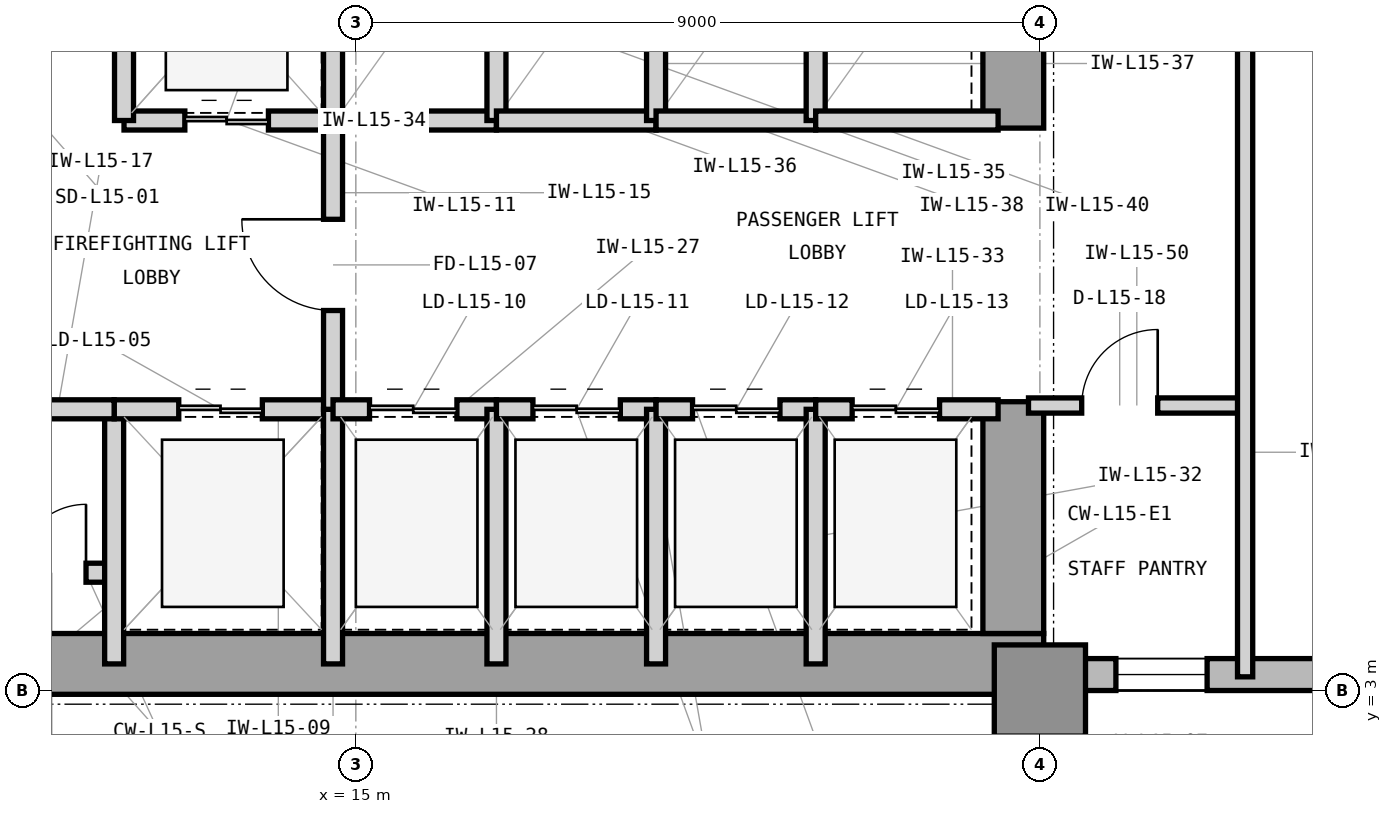
"""IFC4 building model, lengths in metres.
Left out: names, types, materials, properties, quantities, classifications, styles, units other than length and angle.
Written with IfcOpenShell. Run it as: python <this file> out.ifc"""

import sys

from ifc_helpers import new_model, si_unit, direction, frame, frame_2d, origin, origin_2d, place, context, subcontext, project, spatial, rectangle, extrude, element, fill, save


model = new_model("IFC4")
c1 = context("Model", 3, precision=1e-05, world=origin(), true_north=direction((0.0, 1.0)))
c2 = subcontext(c1, "Body", "Model", "MODEL_VIEW")
j1 = project(units=[si_unit("LENGTHUNIT", "METRE"), si_unit("PLANEANGLEUNIT", "RADIAN")], contexts=[c1])
p1 = place(None, origin())
s1 = spatial("IfcSite", under=j1, at=p1, CompositionType="ELEMENT")
p2 = place(p1, origin())
s2 = spatial("IfcBuilding", under=s1, at=p2, CompositionType="ELEMENT")
p3 = place(p2, frame((0.0, 0.0, 67.8)))
s3 = spatial("IfcBuildingStorey", under=s2, at=p3, CompositionType="ELEMENT", Elevation=67.8)
p4 = place(p3, frame((7.475, 3.35, 0.0), z_axis=(0.0, 0.0, 1.0), x_axis=(1.0, 0.0, 0.0)))
e1 = element("IfcWall", 1, at=p4, inside=s3, PredefinedType="SHEAR", context=c2, shape_type="SweptSolid", body=[
    extrude(rectangle(XDim=16.575, YDim=0.8, at=frame_2d((8.288, 0.0))), origin(), (0.0, 0.0, 1.0), 4.2),
])
p5 = place(p3, frame((23.65, 3.75, 0.0), z_axis=(0.0, 0.0, 1.0), x_axis=(0.0, 1.0, 0.0)))
e2 = element("IfcWall", 2, at=p5, inside=s3, PredefinedType="SHEAR", context=c2, shape_type="SweptSolid", body=[
    extrude(rectangle(XDim=3.05, YDim=0.8, at=frame_2d((1.525, 0.0))), origin(), (0.0, 0.0, 1.0), 4.2),
])
p6 = place(p3, frame((23.65, 10.4, 0.0), z_axis=(0.0, 0.0, 1.0), x_axis=(0.0, 1.0, 0.0)))
e3 = element("IfcWall", 3, at=p6, inside=s3, PredefinedType="SHEAR", context=c2, shape_type="SweptSolid", body=[
    extrude(rectangle(XDim=3.2, YDim=0.8, at=frame_2d((1.6, 0.0))), origin(), (0.0, 0.0, 1.0), 4.2),
])
p7 = place(p3, frame((24.0, 3.0, 0.0), z_axis=(0.0, 0.0, 1.0), x_axis=(1.0, 0.0, 0.0)))
e4 = element("IfcColumn", 4, at=p7, inside=s3, PredefinedType="COLUMN", context=c2, shape_type="SweptSolid", body=[
    extrude(rectangle(XDim=1.2, YDim=1.2, at=origin_2d()), origin(), (0.0, 0.0, 1.0), 4.2),
])
p8 = place(p3, frame((23.9, 3.21, 0.0), z_axis=(0.0, 0.0, 1.0), x_axis=(1.0, 0.0, 0.0)))
e5 = element("IfcWall", 5, at=p8, inside=s3, PredefinedType="STANDARD", context=c2, shape_type="SweptSolid", body=[
    extrude(rectangle(XDim=40.5, YDim=0.42, at=frame_2d((20.25, 0.0))), origin(), (0.0, 0.0, 1.0), 3.98),
])
p9 = place(p8, frame((1.1, 0.0, 0.85)))
e6 = element("IfcOpeningElement", 6, at=p9, cuts=e5, PredefinedType="OPENING", context=c2, shape_type="SweptSolid", body=[
    extrude(rectangle(XDim=1.2, YDim=2.45, at=frame_2d((0.6, 1.225))), frame((0.0, 0.22, 0.0), z_axis=(0.0, -1.0, 0.0), x_axis=(1.0, 0.0, 0.0)), (0.0, 0.0, 1.0), 0.44),
])
p10 = place(p8, frame((5.136, 0.0, 0.85)))
e7 = element("IfcOpeningElement", 7, at=p10, cuts=e5, PredefinedType="OPENING", context=c2, shape_type="SweptSolid", body=[
    extrude(rectangle(XDim=2.8, YDim=2.45, at=frame_2d((1.4, 1.225))), frame((0.0, 0.22, 0.0), z_axis=(0.0, -1.0, 0.0), x_axis=(1.0, 0.0, 0.0)), (0.0, 0.0, 1.0), 0.44),
])
p11 = place(p8, frame((12.636, 0.0, 0.85)))
e8 = element("IfcOpeningElement", 8, at=p11, cuts=e5, PredefinedType="OPENING", context=c2, shape_type="SweptSolid", body=[
    extrude(rectangle(XDim=2.8, YDim=2.45, at=frame_2d((1.4, 1.225))), frame((0.0, 0.22, 0.0), z_axis=(0.0, -1.0, 0.0), x_axis=(1.0, 0.0, 0.0)), (0.0, 0.0, 1.0), 0.44),
])
p12 = place(p8, frame((20.336, 0.0, 0.85)))
e9 = element("IfcOpeningElement", 9, at=p12, cuts=e5, PredefinedType="OPENING", context=c2, shape_type="SweptSolid", body=[
    extrude(rectangle(XDim=2.8, YDim=2.45, at=frame_2d((1.4, 1.225))), frame((0.0, 0.22, 0.0), z_axis=(0.0, -1.0, 0.0), x_axis=(1.0, 0.0, 0.0)), (0.0, 0.0, 1.0), 0.44),
])
p13 = place(p8, frame((30.886, 0.0, 0.85)))
e10 = element("IfcOpeningElement", 10, at=p13, cuts=e5, PredefinedType="OPENING", context=c2, shape_type="SweptSolid", body=[
    extrude(rectangle(XDim=1.2, YDim=2.45, at=frame_2d((0.6, 1.225))), frame((0.0, 0.22, 0.0), z_axis=(0.0, -1.0, 0.0), x_axis=(1.0, 0.0, 0.0)), (0.0, 0.0, 1.0), 0.44),
])
p14 = place(p3, frame((10.33, 4.55, 0.0), z_axis=(0.0, 0.0, 1.0), x_axis=(1.0, 0.0, 0.0)))
e11 = element("IfcWall", 11, at=p14, inside=s3, PredefinedType="PARTITIONING", context=c2, shape_type="SweptSolid", body=[
    extrude(rectangle(XDim=1.49, YDim=0.25, at=frame_2d((0.745, 0.0))), origin(), (0.0, 0.0, 1.0), 3.97),
])
p15 = place(p14, frame((0.22, 0.0, 0.0)))
e12 = element("IfcOpeningElement", 12, at=p15, cuts=e11, PredefinedType="OPENING", context=c2, shape_type="SweptSolid", body=[
    extrude(rectangle(XDim=0.9, YDim=2.1, at=frame_2d((0.45, 1.05))), frame((0.0, 0.135, 0.0), z_axis=(0.0, -1.0, 0.0), x_axis=(1.0, 0.0, 0.0)), (0.0, 0.0, 1.0), 0.27),
])
p16 = place(p3, frame((11.82, 3.35, 0.0), z_axis=(0.0, 0.0, 1.0), x_axis=(0.0, 1.0, 0.0)))
e13 = element("IfcWall", 13, at=p16, inside=s3, PredefinedType="PARTITIONING", context=c2, shape_type="SweptSolid", body=[
    extrude(rectangle(XDim=3.35, YDim=0.25, at=frame_2d((1.675, 0.0))), origin(), (0.0, 0.0, 1.0), 3.97),
])
p17 = place(p3, frame((11.82, 6.7, 0.0), z_axis=(0.0, 0.0, 1.0), x_axis=(1.0, 0.0, 0.0)))
e14 = element("IfcWall", 14, at=p17, inside=s3, PredefinedType="PARTITIONING", context=c2, shape_type="SweptSolid", body=[
    extrude(rectangle(XDim=2.88, YDim=0.25, at=frame_2d((1.44, 0.0))), origin(), (0.0, 0.0, 1.0), 3.426),
])
p18 = place(p17, frame((0.85, 0.0, 0.0)))
e15 = element("IfcOpeningElement", 15, at=p18, cuts=e14, PredefinedType="OPENING", context=c2, shape_type="SweptSolid", body=[
    extrude(rectangle(XDim=1.1, YDim=2.25, at=frame_2d((0.55, 1.125))), frame((0.0, 0.135, 0.0), z_axis=(0.0, -1.0, 0.0), x_axis=(1.0, 0.0, 0.0)), (0.0, 0.0, 1.0), 0.27),
])
p19 = place(p3, frame((14.7, 3.35, 0.0), z_axis=(0.0, 0.0, 1.0), x_axis=(0.0, 1.0, 0.0)))
e16 = element("IfcWall", 16, at=p19, inside=s3, PredefinedType="PARTITIONING", context=c2, shape_type="SweptSolid", body=[
    extrude(rectangle(XDim=3.35, YDim=0.25, at=frame_2d((1.675, 0.0))), origin(), (0.0, 0.0, 1.0), 3.97),
])
p20 = place(p3, frame((11.95, 10.5, 0.0), z_axis=(0.0, 0.0, 1.0), x_axis=(1.0, 0.0, 0.0)))
e17 = element("IfcWall", 17, at=p20, inside=s3, PredefinedType="PARTITIONING", context=c2, shape_type="SweptSolid", body=[
    extrude(rectangle(XDim=2.75, YDim=0.25, at=frame_2d((1.375, 0.0))), origin(), (0.0, 0.0, 1.0), 3.426),
])
p21 = place(p20, frame((0.8, 0.0, 0.0)))
e18 = element("IfcOpeningElement", 18, at=p21, cuts=e17, PredefinedType="OPENING", context=c2, shape_type="SweptSolid", body=[
    extrude(rectangle(XDim=1.1, YDim=2.25, at=frame_2d((0.55, 1.125))), frame((0.0, 0.135, 0.0), z_axis=(0.0, -1.0, 0.0), x_axis=(1.0, 0.0, 0.0)), (0.0, 0.0, 1.0), 0.27),
])
for number, where, z_axis, x_axis in (
    (19, (11.95, 10.5, 0.0), (0.0, 0.0, 1.0), (0.0, 1.0, 0.0)),
    (20, (14.7, 10.5, 0.0), (0.0, 0.0, 1.0), (0.0, 1.0, 0.0)),
):
    element("IfcWall", number, at=place(p3, frame(where, z_axis=z_axis, x_axis=x_axis)), inside=s3, PredefinedType="PARTITIONING", context=c2, shape_type="SweptSolid", body=[
        extrude(rectangle(XDim=3.0, YDim=0.25, at=frame_2d((1.5, 0.0))), origin(), (0.0, 0.0, 1.0), 3.97),
    ])
p22 = place(p3, frame((14.7, 6.7, 0.0), z_axis=(0.0, 0.0, 1.0), x_axis=(0.0, 1.0, 0.0)))
e21 = element("IfcWall", 21, at=p22, inside=s3, PredefinedType="PARTITIONING", context=c2, shape_type="SweptSolid", body=[
    extrude(rectangle(XDim=3.8, YDim=0.25, at=frame_2d((1.9, 0.0))), origin(), (0.0, 0.0, 1.0), 3.97),
])
p23 = place(p22, frame((1.3, 0.0, 0.0)))
e22 = element("IfcOpeningElement", 22, at=p23, cuts=e21, PredefinedType="OPENING", context=c2, shape_type="SweptSolid", body=[
    extrude(rectangle(XDim=1.2, YDim=2.2, at=frame_2d((0.6, 1.1))), frame((0.0, 0.135, 0.0), z_axis=(0.0, -1.0, 0.0), x_axis=(1.0, 0.0, 0.0)), (0.0, 0.0, 1.0), 0.27),
])
p24 = place(p3, frame((10.33, 6.7, 0.0), z_axis=(0.0, 0.0, 1.0), x_axis=(1.0, 0.0, 0.0)))
e23 = element("IfcWall", 23, at=p24, inside=s3, PredefinedType="PARTITIONING", context=c2, shape_type="SweptSolid", body=[
    extrude(rectangle(XDim=1.49, YDim=0.25, at=frame_2d((0.745, 0.0))), origin(), (0.0, 0.0, 1.0), 3.426),
])
p25 = place(p3, frame((14.7, 6.7, 0.0), z_axis=(0.0, 0.0, 1.0), x_axis=(1.0, 0.0, 0.0)))
e24 = element("IfcWall", 24, at=p25, inside=s3, PredefinedType="PARTITIONING", context=c2, shape_type="SweptSolid", body=[
    extrude(rectangle(XDim=2.15, YDim=0.25, at=frame_2d((1.075, 0.0))), origin(), (0.0, 0.0, 1.0), 3.426),
])
p26 = place(p25, frame((0.48, 0.0, 0.0)))
e25 = element("IfcOpeningElement", 25, at=p26, cuts=e24, PredefinedType="OPENING", context=c2, shape_type="SweptSolid", body=[
    extrude(rectangle(XDim=1.15, YDim=2.25, at=frame_2d((0.575, 1.125))), frame((0.0, 0.135, 0.0), z_axis=(0.0, -1.0, 0.0), x_axis=(1.0, 0.0, 0.0)), (0.0, 0.0, 1.0), 0.27),
])
p27 = place(p3, frame((16.85, 3.35, 0.0), z_axis=(0.0, 0.0, 1.0), x_axis=(0.0, 1.0, 0.0)))
e26 = element("IfcWall", 26, at=p27, inside=s3, PredefinedType="PARTITIONING", context=c2, shape_type="SweptSolid", body=[
    extrude(rectangle(XDim=3.35, YDim=0.25, at=frame_2d((1.675, 0.0))), origin(), (0.0, 0.0, 1.0), 3.97),
])
p28 = place(p3, frame((16.85, 6.7, 0.0), z_axis=(0.0, 0.0, 1.0), x_axis=(1.0, 0.0, 0.0)))
e27 = element("IfcWall", 27, at=p28, inside=s3, PredefinedType="PARTITIONING", context=c2, shape_type="SweptSolid", body=[
    extrude(rectangle(XDim=2.1, YDim=0.25, at=frame_2d((1.05, 0.0))), origin(), (0.0, 0.0, 1.0), 3.426),
])
p29 = place(p28, frame((0.48, 0.0, 0.0)))
e28 = element("IfcOpeningElement", 28, at=p29, cuts=e27, PredefinedType="OPENING", context=c2, shape_type="SweptSolid", body=[
    extrude(rectangle(XDim=1.15, YDim=2.25, at=frame_2d((0.575, 1.125))), frame((0.0, 0.135, 0.0), z_axis=(0.0, -1.0, 0.0), x_axis=(1.0, 0.0, 0.0)), (0.0, 0.0, 1.0), 0.27),
])
p30 = place(p3, frame((18.95, 3.35, 0.0), z_axis=(0.0, 0.0, 1.0), x_axis=(0.0, 1.0, 0.0)))
e29 = element("IfcWall", 29, at=p30, inside=s3, PredefinedType="PARTITIONING", context=c2, shape_type="SweptSolid", body=[
    extrude(rectangle(XDim=3.35, YDim=0.25, at=frame_2d((1.675, 0.0))), origin(), (0.0, 0.0, 1.0), 3.97),
])
p31 = place(p3, frame((18.95, 6.7, 0.0), z_axis=(0.0, 0.0, 1.0), x_axis=(1.0, 0.0, 0.0)))
e30 = element("IfcWall", 30, at=p31, inside=s3, PredefinedType="PARTITIONING", context=c2, shape_type="SweptSolid", body=[
    extrude(rectangle(XDim=2.1, YDim=0.25, at=frame_2d((1.05, 0.0))), origin(), (0.0, 0.0, 1.0), 3.426),
])
p32 = place(p31, frame((0.48, 0.0, 0.0)))
e31 = element("IfcOpeningElement", 31, at=p32, cuts=e30, PredefinedType="OPENING", context=c2, shape_type="SweptSolid", body=[
    extrude(rectangle(XDim=1.15, YDim=2.25, at=frame_2d((0.575, 1.125))), frame((0.0, 0.135, 0.0), z_axis=(0.0, -1.0, 0.0), x_axis=(1.0, 0.0, 0.0)), (0.0, 0.0, 1.0), 0.27),
])
p33 = place(p3, frame((21.05, 3.35, 0.0), z_axis=(0.0, 0.0, 1.0), x_axis=(0.0, 1.0, 0.0)))
e32 = element("IfcWall", 32, at=p33, inside=s3, PredefinedType="PARTITIONING", context=c2, shape_type="SweptSolid", body=[
    extrude(rectangle(XDim=3.35, YDim=0.25, at=frame_2d((1.675, 0.0))), origin(), (0.0, 0.0, 1.0), 3.97),
])
p34 = place(p3, frame((21.05, 6.7, 0.0), z_axis=(0.0, 0.0, 1.0), x_axis=(1.0, 0.0, 0.0)))
e33 = element("IfcWall", 33, at=p34, inside=s3, PredefinedType="PARTITIONING", context=c2, shape_type="SweptSolid", body=[
    extrude(rectangle(XDim=2.4, YDim=0.25, at=frame_2d((1.2, 0.0))), origin(), (0.0, 0.0, 1.0), 3.426),
])
p35 = place(p34, frame((0.48, 0.0, 0.0)))
e34 = element("IfcOpeningElement", 34, at=p35, cuts=e33, PredefinedType="OPENING", context=c2, shape_type="SweptSolid", body=[
    extrude(rectangle(XDim=1.15, YDim=2.25, at=frame_2d((0.575, 1.125))), frame((0.0, 0.135, 0.0), z_axis=(0.0, -1.0, 0.0), x_axis=(1.0, 0.0, 0.0)), (0.0, 0.0, 1.0), 0.27),
])
p36 = place(p3, frame((14.7, 10.5, 0.0), z_axis=(0.0, 0.0, 1.0), x_axis=(1.0, 0.0, 0.0)))
e35 = element("IfcWall", 35, at=p36, inside=s3, PredefinedType="PARTITIONING", context=c2, shape_type="SweptSolid", body=[
    extrude(rectangle(XDim=2.15, YDim=0.25, at=frame_2d((1.075, 0.0))), origin(), (0.0, 0.0, 1.0), 3.426),
])
p37 = place(p3, frame((16.85, 10.5, 0.0), z_axis=(0.0, 0.0, 1.0), x_axis=(0.0, 1.0, 0.0)))
e36 = element("IfcWall", 36, at=p37, inside=s3, PredefinedType="PARTITIONING", context=c2, shape_type="SweptSolid", body=[
    extrude(rectangle(XDim=3.0, YDim=0.25, at=frame_2d((1.5, 0.0))), origin(), (0.0, 0.0, 1.0), 3.97),
])
p38 = place(p3, frame((16.85, 10.5, 0.0), z_axis=(0.0, 0.0, 1.0), x_axis=(1.0, 0.0, 0.0)))
e37 = element("IfcWall", 37, at=p38, inside=s3, PredefinedType="PARTITIONING", context=c2, shape_type="SweptSolid", body=[
    extrude(rectangle(XDim=2.1, YDim=0.25, at=frame_2d((1.05, 0.0))), origin(), (0.0, 0.0, 1.0), 3.426),
])
p39 = place(p3, frame((18.95, 10.5, 0.0), z_axis=(0.0, 0.0, 1.0), x_axis=(0.0, 1.0, 0.0)))
e38 = element("IfcWall", 38, at=p39, inside=s3, PredefinedType="PARTITIONING", context=c2, shape_type="SweptSolid", body=[
    extrude(rectangle(XDim=3.0, YDim=0.25, at=frame_2d((1.5, 0.0))), origin(), (0.0, 0.0, 1.0), 3.97),
])
p40 = place(p3, frame((18.95, 10.5, 0.0), z_axis=(0.0, 0.0, 1.0), x_axis=(1.0, 0.0, 0.0)))
e39 = element("IfcWall", 39, at=p40, inside=s3, PredefinedType="PARTITIONING", context=c2, shape_type="SweptSolid", body=[
    extrude(rectangle(XDim=2.1, YDim=0.25, at=frame_2d((1.05, 0.0))), origin(), (0.0, 0.0, 1.0), 3.426),
])
p41 = place(p3, frame((21.05, 10.5, 0.0), z_axis=(0.0, 0.0, 1.0), x_axis=(0.0, 1.0, 0.0)))
e40 = element("IfcWall", 40, at=p41, inside=s3, PredefinedType="PARTITIONING", context=c2, shape_type="SweptSolid", body=[
    extrude(rectangle(XDim=3.0, YDim=0.25, at=frame_2d((1.5, 0.0))), origin(), (0.0, 0.0, 1.0), 3.97),
])
p42 = place(p3, frame((21.05, 10.5, 0.0), z_axis=(0.0, 0.0, 1.0), x_axis=(1.0, 0.0, 0.0)))
e41 = element("IfcWall", 41, at=p42, inside=s3, PredefinedType="PARTITIONING", context=c2, shape_type="SweptSolid", body=[
    extrude(rectangle(XDim=2.4, YDim=0.25, at=frame_2d((1.2, 0.0))), origin(), (0.0, 0.0, 1.0), 3.426),
])
p43 = place(p3, frame((23.85, 6.75, 0.0), z_axis=(0.0, 0.0, 1.0), x_axis=(1.0, 0.0, 0.0)))
e42 = element("IfcWall", 42, at=p43, inside=s3, PredefinedType="PARTITIONING", context=c2, shape_type="SweptSolid", body=[
    extrude(rectangle(XDim=2.85, YDim=0.2, at=frame_2d((1.425, 0.0))), origin(), (0.0, 0.0, 1.0), 3.97),
])
p44 = place(p43, frame((0.7, 0.0, 0.0)))
e43 = element("IfcOpeningElement", 43, at=p44, cuts=e42, PredefinedType="OPENING", context=c2, shape_type="SweptSolid", body=[
    extrude(rectangle(XDim=1.0, YDim=2.15, at=frame_2d((0.5, 1.075))), frame((0.0, 0.11, 0.0), z_axis=(0.0, -1.0, 0.0), x_axis=(1.0, 0.0, 0.0)), (0.0, 0.0, 1.0), 0.22),
])
p45 = place(p3, frame((26.7, 3.18, 0.0), z_axis=(0.0, 0.0, 1.0), x_axis=(0.0, 1.0, 0.0)))
e44 = element("IfcWall", 44, at=p45, inside=s3, PredefinedType="PARTITIONING", context=c2, shape_type="SweptSolid", body=[
    extrude(rectangle(XDim=11.82, YDim=0.2, at=frame_2d((5.91, 0.0))), origin(), (0.0, 0.0, 1.0), 3.97),
])
p46 = place(p15, origin())
e45 = element("IfcDoor", 45, at=p46, inside=s3, OperationType="SINGLE_SWING_RIGHT", PredefinedType="TRAPDOOR", context=c2, shape_type="SweptSolid", body=[
    extrude(rectangle(XDim=0.9, YDim=2.1, at=frame_2d((0.45, 1.05))), frame((0.0, 0.025, 0.0), z_axis=(0.0, -1.0, 0.0), x_axis=(1.0, 0.0, 0.0)), (0.0, 0.0, 1.0), 0.05),
])
fill(e12, e45)
p47 = place(p18, origin())
e46 = element("IfcDoor", 46, at=p47, inside=s3, OperationType="DOUBLE_DOOR_SLIDING", PredefinedType="DOOR", context=c2, shape_type="SweptSolid", body=[
    extrude(rectangle(XDim=1.1, YDim=2.25, at=frame_2d((0.55, 1.125))), frame((0.0, 0.025, 0.0), z_axis=(0.0, -1.0, 0.0), x_axis=(1.0, 0.0, 0.0)), (0.0, 0.0, 1.0), 0.05),
])
fill(e15, e46)
p48 = place(p21, origin())
e47 = element("IfcDoor", 47, at=p48, inside=s3, OperationType="DOUBLE_DOOR_SLIDING", PredefinedType="DOOR", context=c2, shape_type="SweptSolid", body=[
    extrude(rectangle(XDim=1.1, YDim=2.25, at=frame_2d((0.55, 1.125))), frame((0.0, 0.025, 0.0), z_axis=(0.0, -1.0, 0.0), x_axis=(1.0, 0.0, 0.0)), (0.0, 0.0, 1.0), 0.05),
])
fill(e18, e47)
p49 = place(p23, origin())
e48 = element("IfcDoor", 48, at=p49, inside=s3, OperationType="SINGLE_SWING_RIGHT", PredefinedType="DOOR", context=c2, shape_type="SweptSolid", body=[
    extrude(rectangle(XDim=1.2, YDim=2.2, at=frame_2d((0.6, 1.1))), frame((0.0, 0.025, 0.0), z_axis=(0.0, -1.0, 0.0), x_axis=(1.0, 0.0, 0.0)), (0.0, 0.0, 1.0), 0.05),
])
fill(e22, e48)
p50 = place(p26, origin())
e49 = element("IfcDoor", 49, at=p50, inside=s3, OperationType="DOUBLE_DOOR_SLIDING", PredefinedType="DOOR", context=c2, shape_type="SweptSolid", body=[
    extrude(rectangle(XDim=1.15, YDim=2.25, at=frame_2d((0.575, 1.125))), frame((0.0, 0.025, 0.0), z_axis=(0.0, -1.0, 0.0), x_axis=(1.0, 0.0, 0.0)), (0.0, 0.0, 1.0), 0.05),
])
fill(e25, e49)
p51 = place(p29, origin())
e50 = element("IfcDoor", 50, at=p51, inside=s3, OperationType="DOUBLE_DOOR_SLIDING", PredefinedType="DOOR", context=c2, shape_type="SweptSolid", body=[
    extrude(rectangle(XDim=1.15, YDim=2.25, at=frame_2d((0.575, 1.125))), frame((0.0, 0.025, 0.0), z_axis=(0.0, -1.0, 0.0), x_axis=(1.0, 0.0, 0.0)), (0.0, 0.0, 1.0), 0.05),
])
fill(e28, e50)
p52 = place(p32, origin())
e51 = element("IfcDoor", 51, at=p52, inside=s3, OperationType="DOUBLE_DOOR_SLIDING", PredefinedType="DOOR", context=c2, shape_type="SweptSolid", body=[
    extrude(rectangle(XDim=1.15, YDim=2.25, at=frame_2d((0.575, 1.125))), frame((0.0, 0.025, 0.0), z_axis=(0.0, -1.0, 0.0), x_axis=(1.0, 0.0, 0.0)), (0.0, 0.0, 1.0), 0.05),
])
fill(e31, e51)
p53 = place(p35, origin())
e52 = element("IfcDoor", 52, at=p53, inside=s3, OperationType="DOUBLE_DOOR_SLIDING", PredefinedType="DOOR", context=c2, shape_type="SweptSolid", body=[
    extrude(rectangle(XDim=1.15, YDim=2.25, at=frame_2d((0.575, 1.125))), frame((0.0, 0.025, 0.0), z_axis=(0.0, -1.0, 0.0), x_axis=(1.0, 0.0, 0.0)), (0.0, 0.0, 1.0), 0.05),
])
fill(e34, e52)
p54 = place(p44, origin())
e53 = element("IfcDoor", 53, at=p54, inside=s3, OperationType="SINGLE_SWING_RIGHT", PredefinedType="DOOR", context=c2, shape_type="SweptSolid", body=[
    extrude(rectangle(XDim=1.0, YDim=2.15, at=frame_2d((0.5, 1.075))), frame((0.0, 0.025, 0.0), z_axis=(0.0, -1.0, 0.0), x_axis=(1.0, 0.0, 0.0)), (0.0, 0.0, 1.0), 0.05),
])
fill(e43, e53)
p55 = place(p9, origin())
e54 = element("IfcWindow", 54, at=p55, inside=s3, PartitioningType="SINGLE_PANEL", PredefinedType="WINDOW", context=c2, shape_type="SweptSolid", body=[
    extrude(rectangle(XDim=1.2, YDim=2.45, at=frame_2d((0.6, 1.225))), frame((0.0, 0.11, 0.0), z_axis=(0.0, -1.0, 0.0), x_axis=(1.0, 0.0, 0.0)), (0.0, 0.0, 1.0), 0.06),
])
fill(e6, e54)
save(model, sys.argv[1])
